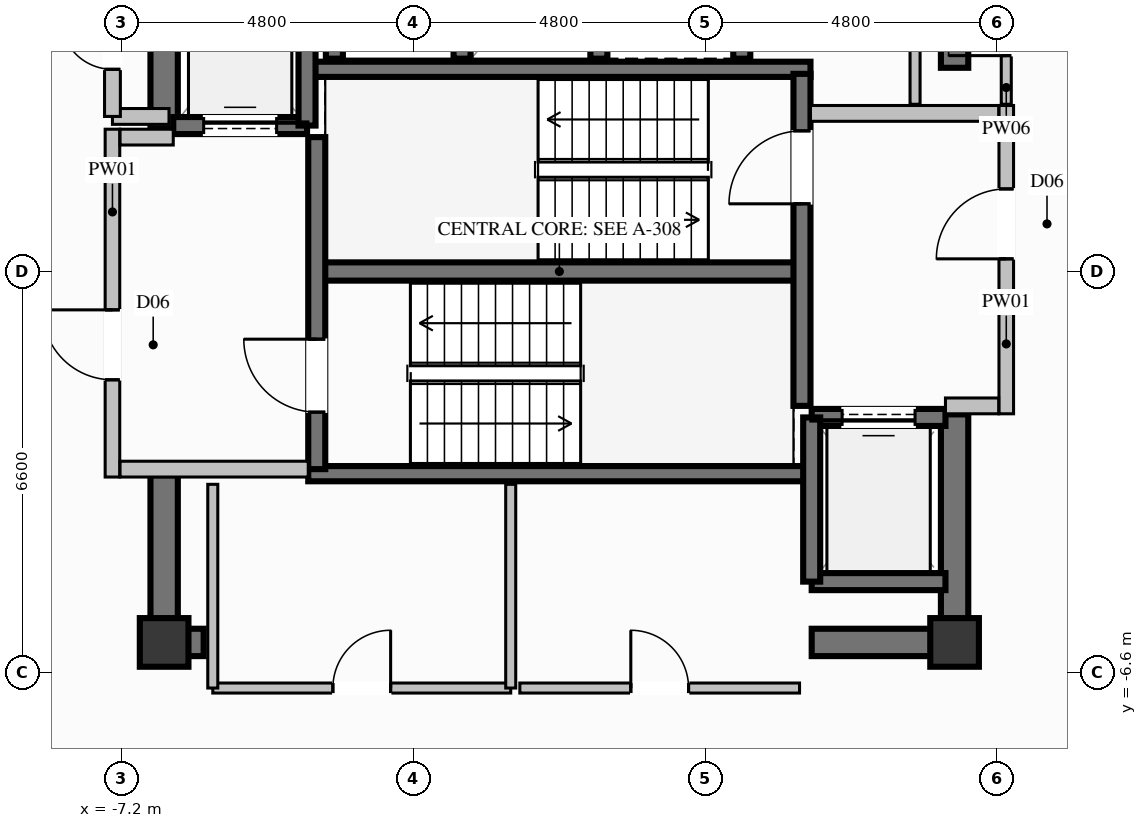
"""IFC4 building model, lengths in metres.
Left out: names, types, materials, properties, quantities, classifications, styles, units other than length and angle.
Written with IfcOpenShell. Run it as: python <this file> out.ifc"""

import sys

from ifc_helpers import new_model, si_unit, direction, frame, frame_2d, origin, origin_2d, place, context, subcontext, project, spatial, rectangle, extrude, element, fill, save


model = new_model("IFC4")
c1 = context("Model", 3, precision=1e-05, world=origin(), true_north=direction((0.0, 1.0)))
c2 = subcontext(c1, "Body", "Model", "MODEL_VIEW")
j1 = project(units=[si_unit("LENGTHUNIT", "METRE"), si_unit("PLANEANGLEUNIT", "RADIAN")], contexts=[c1])
p1 = place(None, origin())
s1 = spatial("IfcSite", under=j1, at=p1, CompositionType="ELEMENT")
p2 = place(p1, origin())
s2 = spatial("IfcBuilding", under=s1, at=p2, CompositionType="ELEMENT")
p3 = place(p2, frame((0.0, 0.0, 239.2)))
s3 = spatial("IfcBuildingStorey", under=s2, at=p3, CompositionType="ELEMENT", Elevation=239.2)
for number, where, z_axis, x_axis in (
    (1, (-6.5, -6.1, 0.0), (0.0, 0.0, 1.0), (1.0, 0.0, 0.0)),
    (2, (6.5, -6.1, 0.0), (0.0, 0.0, 1.0), (1.0, 0.0, 0.0)),
):
    element("IfcColumn", number, at=place(p3, frame(where, z_axis=z_axis, x_axis=x_axis)), inside=s3, PredefinedType="COLUMN", context=c2, shape_type="SweptSolid", body=[
        extrude(rectangle(XDim=0.8, YDim=0.8, at=origin_2d()), origin(), (0.0, 0.0, 1.0), 3.8),
    ])
p4 = place(p3, frame((-3.99, 0.0, 0.0), z_axis=(0.0, 0.0, 1.0), x_axis=(1.0, 0.0, 0.0)))
e3 = element("IfcWall", 3, at=p4, inside=s3, PredefinedType="SHEAR", context=c2, shape_type="SweptSolid", body=[
    extrude(rectangle(XDim=7.98, YDim=0.3, at=frame_2d((3.99, 0.0))), origin(), (0.0, 0.0, 1.0), 3.8),
])
for number, where, z_axis, x_axis in (
    (4, (-4.13, -3.325, 0.0), (0.0, 0.0, 1.0), (1.0, 0.0, 0.0)),
    (5, (-4.13, 3.325, 0.0), (0.0, 0.0, 1.0), (1.0, 0.0, 0.0)),
):
    element("IfcWall", number, at=place(p3, frame(where, z_axis=z_axis, x_axis=x_axis)), inside=s3, PredefinedType="SOLIDWALL", context=c2, shape_type="SweptSolid", body=[
        extrude(rectangle(XDim=8.26, YDim=0.25, at=frame_2d((4.13, 0.0))), origin(), (0.0, 0.0, 1.0), 3.8),
    ])
p5 = place(p3, frame((-6.275, -6.1, 0.0), z_axis=(0.0, 0.0, 1.0), x_axis=(1.0, 0.0, 0.0)))
e6 = element("IfcWall", 6, at=p5, inside=s3, PredefinedType="SHEAR", context=c2, shape_type="SweptSolid", body=[
    extrude(rectangle(XDim=0.425, YDim=0.45, at=frame_2d((0.212, 0.0))), origin(), (0.0, 0.0, 1.0), 3.8),
])
p6 = place(p3, frame((4.15, -6.1, 0.0), z_axis=(0.0, 0.0, 1.0), x_axis=(1.0, 0.0, 0.0)))
e7 = element("IfcWall", 7, at=p6, inside=s3, PredefinedType="SHEAR", context=c2, shape_type="SweptSolid", body=[
    extrude(rectangle(XDim=2.125, YDim=0.45, at=frame_2d((1.062, 0.0))), origin(), (0.0, 0.0, 1.0), 3.8),
])
p7 = place(p3, frame((-6.5, 2.35, 0.0), z_axis=(0.0, 0.0, 1.0), x_axis=(0.0, 1.0, 0.0)))
e8 = element("IfcWall", 8, at=p7, inside=s3, PredefinedType="SHEAR", context=c2, shape_type="SweptSolid", body=[
    extrude(rectangle(XDim=3.975, YDim=0.45, at=frame_2d((1.987, 0.0))), origin(), (0.0, 0.0, 1.0), 3.8),
])
p8 = place(p3, frame((-6.5, -6.325, 0.0), z_axis=(0.0, 0.0, 1.0), x_axis=(0.0, 1.0, 0.0)))
e9 = element("IfcWall", 9, at=p8, inside=s3, PredefinedType="SHEAR", context=c2, shape_type="SweptSolid", body=[
    extrude(rectangle(XDim=2.975, YDim=0.45, at=frame_2d((1.487, 0.0))), origin(), (0.0, 0.0, 1.0), 3.8),
])
p9 = place(p3, frame((6.5, -6.325, 0.0), z_axis=(0.0, 0.0, 1.0), x_axis=(0.0, 1.0, 0.0)))
e10 = element("IfcWall", 10, at=p9, inside=s3, PredefinedType="SHEAR", context=c2, shape_type="SweptSolid", body=[
    extrude(rectangle(XDim=3.975, YDim=0.45, at=frame_2d((1.987, 0.0))), origin(), (0.0, 0.0, 1.0), 3.8),
])
p10 = place(p3, frame((6.5, 3.35, 0.0), z_axis=(0.0, 0.0, 1.0), x_axis=(0.0, 1.0, 0.0)))
e11 = element("IfcWall", 11, at=p10, inside=s3, PredefinedType="SHEAR", context=c2, shape_type="SweptSolid", body=[
    extrude(rectangle(XDim=2.975, YDim=0.45, at=frame_2d((1.487, 0.0))), origin(), (0.0, 0.0, 1.0), 3.8),
])
for number, where, z_axis, x_axis in (
    (12, (-3.7, 6.0, 0.0), (0.0, 0.0, 1.0), (0.0, -1.0, 0.0)),
    (13, (-1.6, 3.5, 0.0), (0.0, 0.0, 1.0), (0.0, 1.0, 0.0)),
    (14, (0.65, 3.5, 0.0), (0.0, 0.0, 1.0), (0.0, 1.0, 0.0)),
    (15, (3.0, 3.5, 0.0), (0.0, 0.0, 1.0), (0.0, 1.0, 0.0)),
):
    element("IfcWall", number, at=place(p3, frame(where, z_axis=z_axis, x_axis=x_axis)), inside=s3, PredefinedType="SOLIDWALL", context=c2, shape_type="SweptSolid", body=[
        extrude(rectangle(XDim=2.5, YDim=0.28, at=frame_2d((1.25, 0.0))), origin(), (0.0, 0.0, 1.0), 3.57),
    ])
p11 = place(p3, frame((-6.35, 2.4, 0.0), z_axis=(0.0, 0.0, 1.0), x_axis=(1.0, 0.0, 0.0)))
e16 = element("IfcWall", 16, at=p11, inside=s3, PredefinedType="SOLIDWALL", context=c2, shape_type="SweptSolid", body=[
    extrude(rectangle(XDim=2.2, YDim=0.28, at=frame_2d((1.1, 0.0))), origin(), (0.0, 0.0, 1.0), 3.57),
])
p12 = place(p11, frame((0.5, 0.0, 0.0)))
e17 = element("IfcOpeningElement", 17, at=p12, cuts=e16, PredefinedType="OPENING", context=c2, shape_type="SweptSolid", body=[
    extrude(rectangle(XDim=1.2, YDim=2.2, at=frame_2d((0.6, 1.1))), frame((0.0, 0.15, 0.0), z_axis=(0.0, -1.0, 0.0), x_axis=(1.0, 0.0, 0.0)), (0.0, 0.0, 1.0), 0.3),
])
p13 = place(p3, frame((-4.15, 2.4, 0.0), z_axis=(0.0, 0.0, 1.0), x_axis=(0.0, 1.0, 0.0)))
e18 = element("IfcWall", 18, at=p13, inside=s3, PredefinedType="SOLIDWALL", context=c2, shape_type="SweptSolid", body=[
    extrude(rectangle(XDim=2.7, YDim=0.28, at=frame_2d((1.35, 0.0))), origin(), (0.0, 0.0, 1.0), 3.57),
])
p14 = place(p3, frame((4.15, -5.1, 0.0), z_axis=(0.0, 0.0, 1.0), x_axis=(1.0, 0.0, 0.0)))
e19 = element("IfcWall", 19, at=p14, inside=s3, PredefinedType="SOLIDWALL", context=c2, shape_type="SweptSolid", body=[
    extrude(rectangle(XDim=2.2, YDim=0.28, at=frame_2d((1.1, 0.0))), origin(), (0.0, 0.0, 1.0), 3.57),
])
p15 = place(p3, frame((6.35, -2.4, 0.0), z_axis=(0.0, 0.0, 1.0), x_axis=(-1.0, 0.0, 0.0)))
e20 = element("IfcWall", 20, at=p15, inside=s3, PredefinedType="SOLIDWALL", context=c2, shape_type="SweptSolid", body=[
    extrude(rectangle(XDim=2.2, YDim=0.28, at=frame_2d((1.1, 0.0))), origin(), (0.0, 0.0, 1.0), 3.57),
])
p16 = place(p15, frame((0.5, 0.0, 0.0)))
e21 = element("IfcOpeningElement", 21, at=p16, cuts=e20, PredefinedType="OPENING", context=c2, shape_type="SweptSolid", body=[
    extrude(rectangle(XDim=1.2, YDim=2.2, at=frame_2d((0.6, 1.1))), frame((0.0, 0.15, 0.0), z_axis=(0.0, -1.0, 0.0), x_axis=(1.0, 0.0, 0.0)), (0.0, 0.0, 1.0), 0.3),
])
p17 = place(p3, frame((4.15, -2.4, 0.0), z_axis=(0.0, 0.0, 1.0), x_axis=(0.0, -1.0, 0.0)))
e22 = element("IfcWall", 22, at=p17, inside=s3, PredefinedType="SOLIDWALL", context=c2, shape_type="SweptSolid", body=[
    extrude(rectangle(XDim=2.7, YDim=0.28, at=frame_2d((1.35, 0.0))), origin(), (0.0, 0.0, 1.0), 3.57),
])
p18 = place(p3, frame((-3.99, -3.25, 0.0), z_axis=(0.0, 0.0, 1.0), x_axis=(0.0, 1.0, 0.0)))
e23 = element("IfcWall", 23, at=p18, inside=s3, PredefinedType="SOLIDWALL", context=c2, shape_type="SweptSolid", body=[
    extrude(rectangle(XDim=5.46, YDim=0.28, at=frame_2d((2.73, 0.0))), origin(), (0.0, 0.0, 1.0), 3.57),
])
p19 = place(p18, frame((0.937, 0.0, 0.0)))
e24 = element("IfcOpeningElement", 24, at=p19, cuts=e23, PredefinedType="OPENING", context=c2, shape_type="SweptSolid", body=[
    extrude(rectangle(XDim=1.2, YDim=2.2, at=frame_2d((0.6, 1.1))), frame((0.0, 0.15, 0.0), z_axis=(0.0, -1.0, 0.0), x_axis=(1.0, 0.0, 0.0)), (0.0, 0.0, 1.0), 0.3),
])
p20 = place(p3, frame((3.99, -2.21, 0.0), z_axis=(0.0, 0.0, 1.0), x_axis=(0.0, 1.0, 0.0)))
e25 = element("IfcWall", 25, at=p20, inside=s3, PredefinedType="SOLIDWALL", context=c2, shape_type="SweptSolid", body=[
    extrude(rectangle(XDim=5.46, YDim=0.28, at=frame_2d((2.73, 0.0))), origin(), (0.0, 0.0, 1.0), 3.57),
])
p21 = place(p20, frame((3.323, 0.0, 0.0)))
e26 = element("IfcOpeningElement", 26, at=p21, cuts=e25, PredefinedType="OPENING", context=c2, shape_type="SweptSolid", body=[
    extrude(rectangle(XDim=1.2, YDim=2.2, at=frame_2d((0.6, 1.1))), frame((0.0, 0.15, 0.0), z_axis=(0.0, -1.0, 0.0), x_axis=(1.0, 0.0, 0.0)), (0.0, 0.0, 1.0), 0.3),
])
p22 = place(p3, frame((-7.35, -3.38, 0.0), z_axis=(0.0, 0.0, 1.0), x_axis=(0.0, 1.0, 0.0)))
e27 = element("IfcWall", 27, at=p22, inside=s3, PredefinedType="PARTITIONING", context=c2, shape_type="SweptSolid", body=[
    extrude(rectangle(XDim=5.72, YDim=0.24, at=frame_2d((2.86, 0.0))), origin(), (0.0, 0.0, 1.0), 2.655),
])
p23 = place(p22, frame((1.599, 0.0, 0.0)))
e28 = element("IfcOpeningElement", 28, at=p23, cuts=e27, PredefinedType="OPENING", context=c2, shape_type="SweptSolid", body=[
    extrude(rectangle(XDim=1.15, YDim=2.2, at=frame_2d((0.575, 1.1))), frame((0.0, 0.13, 0.0), z_axis=(0.0, -1.0, 0.0), x_axis=(1.0, 0.0, 0.0)), (0.0, 0.0, 1.0), 0.26),
])
p24 = place(p3, frame((-7.225, -3.25, 0.0), z_axis=(0.0, 0.0, 1.0), x_axis=(1.0, 0.0, 0.0)))
e29 = element("IfcWall", 29, at=p24, inside=s3, PredefinedType="PARTITIONING", context=c2, shape_type="SweptSolid", body=[
    extrude(rectangle(XDim=3.095, YDim=0.26, at=frame_2d((1.548, 0.0))), origin(), (0.0, 0.0, 1.0), 3.57),
])
p25 = place(p3, frame((-7.225, 2.21, 0.0), z_axis=(0.0, 0.0, 1.0), x_axis=(1.0, 0.0, 0.0)))
e30 = element("IfcWall", 30, at=p25, inside=s3, PredefinedType="PARTITIONING", context=c2, shape_type="SweptSolid", body=[
    extrude(rectangle(XDim=0.875, YDim=0.26, at=frame_2d((0.438, 0.0))), origin(), (0.0, 0.0, 1.0), 3.57),
])
p26 = place(p3, frame((7.35, -2.34, 0.0), z_axis=(0.0, 0.0, 1.0), x_axis=(0.0, 1.0, 0.0)))
e31 = element("IfcWall", 31, at=p26, inside=s3, PredefinedType="PARTITIONING", context=c2, shape_type="SweptSolid", body=[
    extrude(rectangle(XDim=5.07, YDim=0.24, at=frame_2d((2.535, 0.0))), origin(), (0.0, 0.0, 1.0), 2.655),
])
p27 = place(p26, frame((2.548, 0.0, 0.0)))
e32 = element("IfcOpeningElement", 32, at=p27, cuts=e31, PredefinedType="OPENING", context=c2, shape_type="SweptSolid", body=[
    extrude(rectangle(XDim=1.15, YDim=2.2, at=frame_2d((0.575, 1.1))), frame((0.0, 0.13, 0.0), z_axis=(0.0, -1.0, 0.0), x_axis=(1.0, 0.0, 0.0)), (0.0, 0.0, 1.0), 0.26),
])
p28 = place(p3, frame((6.35, -2.21, 0.0), z_axis=(0.0, 0.0, 1.0), x_axis=(1.0, 0.0, 0.0)))
e33 = element("IfcWall", 33, at=p28, inside=s3, PredefinedType="PARTITIONING", context=c2, shape_type="SweptSolid", body=[
    extrude(rectangle(XDim=0.875, YDim=0.26, at=frame_2d((0.438, 0.0))), origin(), (0.0, 0.0, 1.0), 3.57),
])
p29 = place(p3, frame((4.13, 2.6, 0.0), z_axis=(0.0, 0.0, 1.0), x_axis=(1.0, 0.0, 0.0)))
e34 = element("IfcWall", 34, at=p29, inside=s3, PredefinedType="PARTITIONING", context=c2, shape_type="SweptSolid", body=[
    extrude(rectangle(XDim=3.095, YDim=0.26, at=frame_2d((1.548, 0.0))), origin(), (0.0, 0.0, 1.0), 3.57),
])
p30 = place(p3, frame((-7.35, 2.55, 0.0), z_axis=(0.0, 0.0, 1.0), x_axis=(1.0, 0.0, 0.0)))
e35 = element("IfcWall", 35, at=p30, inside=s3, PredefinedType="PARTITIONING", context=c2, shape_type="SweptSolid", body=[
    extrude(rectangle(XDim=0.93, YDim=0.26, at=frame_2d((0.465, 0.0))), origin(), (0.0, 0.0, 1.0), 3.57),
])
p31 = place(p3, frame((-7.35, 2.55, 0.0), z_axis=(0.0, 0.0, 1.0), x_axis=(0.0, 1.0, 0.0)))
e36 = element("IfcWall", 36, at=p31, inside=s3, PredefinedType="PARTITIONING", context=c2, shape_type="SweptSolid", body=[
    extrude(rectangle(XDim=2.4, YDim=0.26, at=frame_2d((1.2, 0.0))), origin(), (0.0, 0.0, 1.0), 2.655),
])
p32 = place(p31, frame((0.775, 0.0, 0.0)))
e37 = element("IfcOpeningElement", 37, at=p32, cuts=e36, PredefinedType="OPENING", context=c2, shape_type="SweptSolid", body=[
    extrude(rectangle(XDim=0.85, YDim=2.05, at=frame_2d((0.425, 1.025))), frame((0.0, 0.14, 0.0), z_axis=(0.0, -1.0, 0.0), x_axis=(1.0, 0.0, 0.0)), (0.0, 0.0, 1.0), 0.28),
])
p33 = place(p3, frame((7.35, 2.75, 0.0), z_axis=(0.0, 0.0, 1.0), x_axis=(0.0, 1.0, 0.0)))
e38 = element("IfcWall", 38, at=p33, inside=s3, PredefinedType="PARTITIONING", context=c2, shape_type="SweptSolid", body=[
    extrude(rectangle(XDim=2.55, YDim=0.165, at=frame_2d((1.275, 0.0))), origin(), (0.0, 0.0, 1.0), 3.57),
])
p34 = place(p33, frame((0.8, 0.0, 0.0)))
e39 = element("IfcOpeningElement", 39, at=p34, cuts=e38, PredefinedType="OPENING", context=c2, shape_type="SweptSolid", body=[
    extrude(rectangle(XDim=0.95, YDim=2.1, at=frame_2d((0.475, 1.05))), frame((0.0, 0.093, 0.0), z_axis=(0.0, -1.0, 0.0), x_axis=(1.0, 0.0, 0.0)), (0.0, 0.0, 1.0), 0.185),
])
p35 = place(p3, frame((5.85, 5.3, 0.0), z_axis=(0.0, 0.0, 1.0), x_axis=(0.0, -1.0, 0.0)))
e40 = element("IfcWall", 40, at=p35, inside=s3, PredefinedType="PARTITIONING", context=c2, shape_type="SweptSolid", body=[
    extrude(rectangle(XDim=2.55, YDim=0.165, at=frame_2d((1.275, 0.0))), origin(), (0.0, 0.0, 1.0), 2.655),
])
p36 = place(p3, frame((-5.7, -6.85, 0.0), z_axis=(0.0, 0.0, 1.0), x_axis=(1.0, 0.0, 0.0)))
e41 = element("IfcWall", 41, at=p36, inside=s3, PredefinedType="PARTITIONING", context=c2, shape_type="SweptSolid", body=[
    extrude(rectangle(XDim=4.9, YDim=0.165, at=frame_2d((2.45, 0.0))), origin(), (0.0, 0.0, 1.0), 2.655),
])
p37 = place(p36, frame((1.975, 0.0, 0.0)))
e42 = element("IfcOpeningElement", 42, at=p37, cuts=e41, PredefinedType="OPENING", context=c2, shape_type="SweptSolid", body=[
    extrude(rectangle(XDim=0.95, YDim=2.1, at=frame_2d((0.475, 1.05))), frame((0.0, 0.093, 0.0), z_axis=(0.0, -1.0, 0.0), x_axis=(1.0, 0.0, 0.0)), (0.0, 0.0, 1.0), 0.185),
])
p38 = place(p3, frame((-0.8, -6.85, 0.0), z_axis=(0.0, 0.0, 1.0), x_axis=(0.0, 1.0, 0.0)))
e43 = element("IfcWall", 43, at=p38, inside=s3, PredefinedType="PARTITIONING", context=c2, shape_type="SweptSolid", body=[
    extrude(rectangle(XDim=3.35, YDim=0.165, at=frame_2d((1.675, 0.0))), origin(), (0.0, 0.0, 1.0), 3.57),
])
p39 = place(p3, frame((-5.7, -3.5, 0.0), z_axis=(0.0, 0.0, 1.0), x_axis=(0.0, -1.0, 0.0)))
e44 = element("IfcWall", 44, at=p39, inside=s3, PredefinedType="PARTITIONING", context=c2, shape_type="SweptSolid", body=[
    extrude(rectangle(XDim=3.35, YDim=0.165, at=frame_2d((1.675, 0.0))), origin(), (0.0, 0.0, 1.0), 2.655),
])
p40 = place(p3, frame((-0.65, -6.85, 0.0), z_axis=(0.0, 0.0, 1.0), x_axis=(1.0, 0.0, 0.0)))
e45 = element("IfcWall", 45, at=p40, inside=s3, PredefinedType="PARTITIONING", context=c2, shape_type="SweptSolid", body=[
    extrude(rectangle(XDim=4.6, YDim=0.165, at=frame_2d((2.3, 0.0))), origin(), (0.0, 0.0, 1.0), 2.655),
])
p41 = place(p40, frame((1.825, 0.0, 0.0)))
e46 = element("IfcOpeningElement", 46, at=p41, cuts=e45, PredefinedType="OPENING", context=c2, shape_type="SweptSolid", body=[
    extrude(rectangle(XDim=0.95, YDim=2.1, at=frame_2d((0.475, 1.05))), frame((0.0, 0.093, 0.0), z_axis=(0.0, -1.0, 0.0), x_axis=(1.0, 0.0, 0.0)), (0.0, 0.0, 1.0), 0.185),
])
p42 = place(p12, origin())
e47 = element("IfcDoor", 47, at=p42, inside=s3, OperationType="SLIDING_TO_LEFT", PredefinedType="DOOR", context=c2, shape_type="SweptSolid", body=[
    extrude(rectangle(XDim=1.2, YDim=2.2, at=frame_2d((0.6, 1.1))), frame((0.0, 0.025, 0.0), z_axis=(0.0, -1.0, 0.0), x_axis=(1.0, 0.0, 0.0)), (0.0, 0.0, 1.0), 0.05),
])
fill(e17, e47)
p43 = place(p16, origin())
e48 = element("IfcDoor", 48, at=p43, inside=s3, OperationType="SLIDING_TO_LEFT", PredefinedType="DOOR", context=c2, shape_type="SweptSolid", body=[
    extrude(rectangle(XDim=1.2, YDim=2.2, at=frame_2d((0.6, 1.1))), frame((0.0, 0.025, 0.0), z_axis=(0.0, -1.0, 0.0), x_axis=(1.0, 0.0, 0.0)), (0.0, 0.0, 1.0), 0.05),
])
fill(e21, e48)
p44 = place(p19, origin())
e49 = element("IfcDoor", 49, at=p44, inside=s3, OperationType="SINGLE_SWING_RIGHT", PredefinedType="DOOR", context=c2, shape_type="SweptSolid", body=[
    extrude(rectangle(XDim=1.2, YDim=2.2, at=frame_2d((0.6, 1.1))), frame((0.0, 0.025, 0.0), z_axis=(0.0, -1.0, 0.0), x_axis=(1.0, 0.0, 0.0)), (0.0, 0.0, 1.0), 0.05),
])
fill(e24, e49)
p45 = place(p21, origin())
e50 = element("IfcDoor", 50, at=p45, inside=s3, OperationType="SINGLE_SWING_LEFT", PredefinedType="DOOR", context=c2, shape_type="SweptSolid", body=[
    extrude(rectangle(XDim=1.2, YDim=2.2, at=frame_2d((0.6, 1.1))), frame((0.0, 0.025, 0.0), z_axis=(0.0, -1.0, 0.0), x_axis=(1.0, 0.0, 0.0)), (0.0, 0.0, 1.0), 0.05),
])
fill(e26, e50)
p46 = place(p23, origin())
e51 = element("IfcDoor", 51, at=p46, inside=s3, OperationType="SINGLE_SWING_RIGHT", PredefinedType="DOOR", context=c2, shape_type="SweptSolid", body=[
    extrude(rectangle(XDim=1.15, YDim=2.2, at=frame_2d((0.575, 1.1))), frame((0.0, 0.025, 0.0), z_axis=(0.0, -1.0, 0.0), x_axis=(1.0, 0.0, 0.0)), (0.0, 0.0, 1.0), 0.05),
])
fill(e28, e51)
p47 = place(p27, origin())
e52 = element("IfcDoor", 52, at=p47, inside=s3, OperationType="SINGLE_SWING_LEFT", PredefinedType="DOOR", context=c2, shape_type="SweptSolid", body=[
    extrude(rectangle(XDim=1.15, YDim=2.2, at=frame_2d((0.575, 1.1))), frame((0.0, 0.025, 0.0), z_axis=(0.0, -1.0, 0.0), x_axis=(1.0, 0.0, 0.0)), (0.0, 0.0, 1.0), 0.05),
])
fill(e32, e52)
p48 = place(p32, origin())
e53 = element("IfcDoor", 53, at=p48, inside=s3, OperationType="SINGLE_SWING_RIGHT", PredefinedType="DOOR", context=c2, shape_type="SweptSolid", body=[
    extrude(rectangle(XDim=0.85, YDim=2.05, at=frame_2d((0.425, 1.025))), frame((0.0, 0.025, 0.0), z_axis=(0.0, -1.0, 0.0), x_axis=(1.0, 0.0, 0.0)), (0.0, 0.0, 1.0), 0.05),
])
fill(e37, e53)
p49 = place(p34, origin())
e54 = element("IfcDoor", 54, at=p49, inside=s3, OperationType="SINGLE_SWING_LEFT", PredefinedType="DOOR", context=c2, shape_type="SweptSolid", body=[
    extrude(rectangle(XDim=0.95, YDim=2.1, at=frame_2d((0.475, 1.05))), frame((0.0, 0.025, 0.0), z_axis=(0.0, -1.0, 0.0), x_axis=(1.0, 0.0, 0.0)), (0.0, 0.0, 1.0), 0.05),
])
fill(e39, e54)
p50 = place(p37, origin())
e55 = element("IfcDoor", 55, at=p50, inside=s3, OperationType="SINGLE_SWING_RIGHT", PredefinedType="DOOR", context=c2, shape_type="SweptSolid", body=[
    extrude(rectangle(XDim=0.95, YDim=2.1, at=frame_2d((0.475, 1.05))), frame((0.0, 0.025, 0.0), z_axis=(0.0, -1.0, 0.0), x_axis=(1.0, 0.0, 0.0)), (0.0, 0.0, 1.0), 0.05),
])
fill(e42, e55)
p51 = place(p41, origin())
e56 = element("IfcDoor", 56, at=p51, inside=s3, OperationType="SINGLE_SWING_LEFT", PredefinedType="DOOR", context=c2, shape_type="SweptSolid", body=[
    extrude(rectangle(XDim=0.95, YDim=2.1, at=frame_2d((0.475, 1.05))), frame((0.0, 0.025, 0.0), z_axis=(0.0, -1.0, 0.0), x_axis=(1.0, 0.0, 0.0)), (0.0, 0.0, 1.0), 0.05),
])
fill(e46, e56)
save(model, sys.argv[1])
